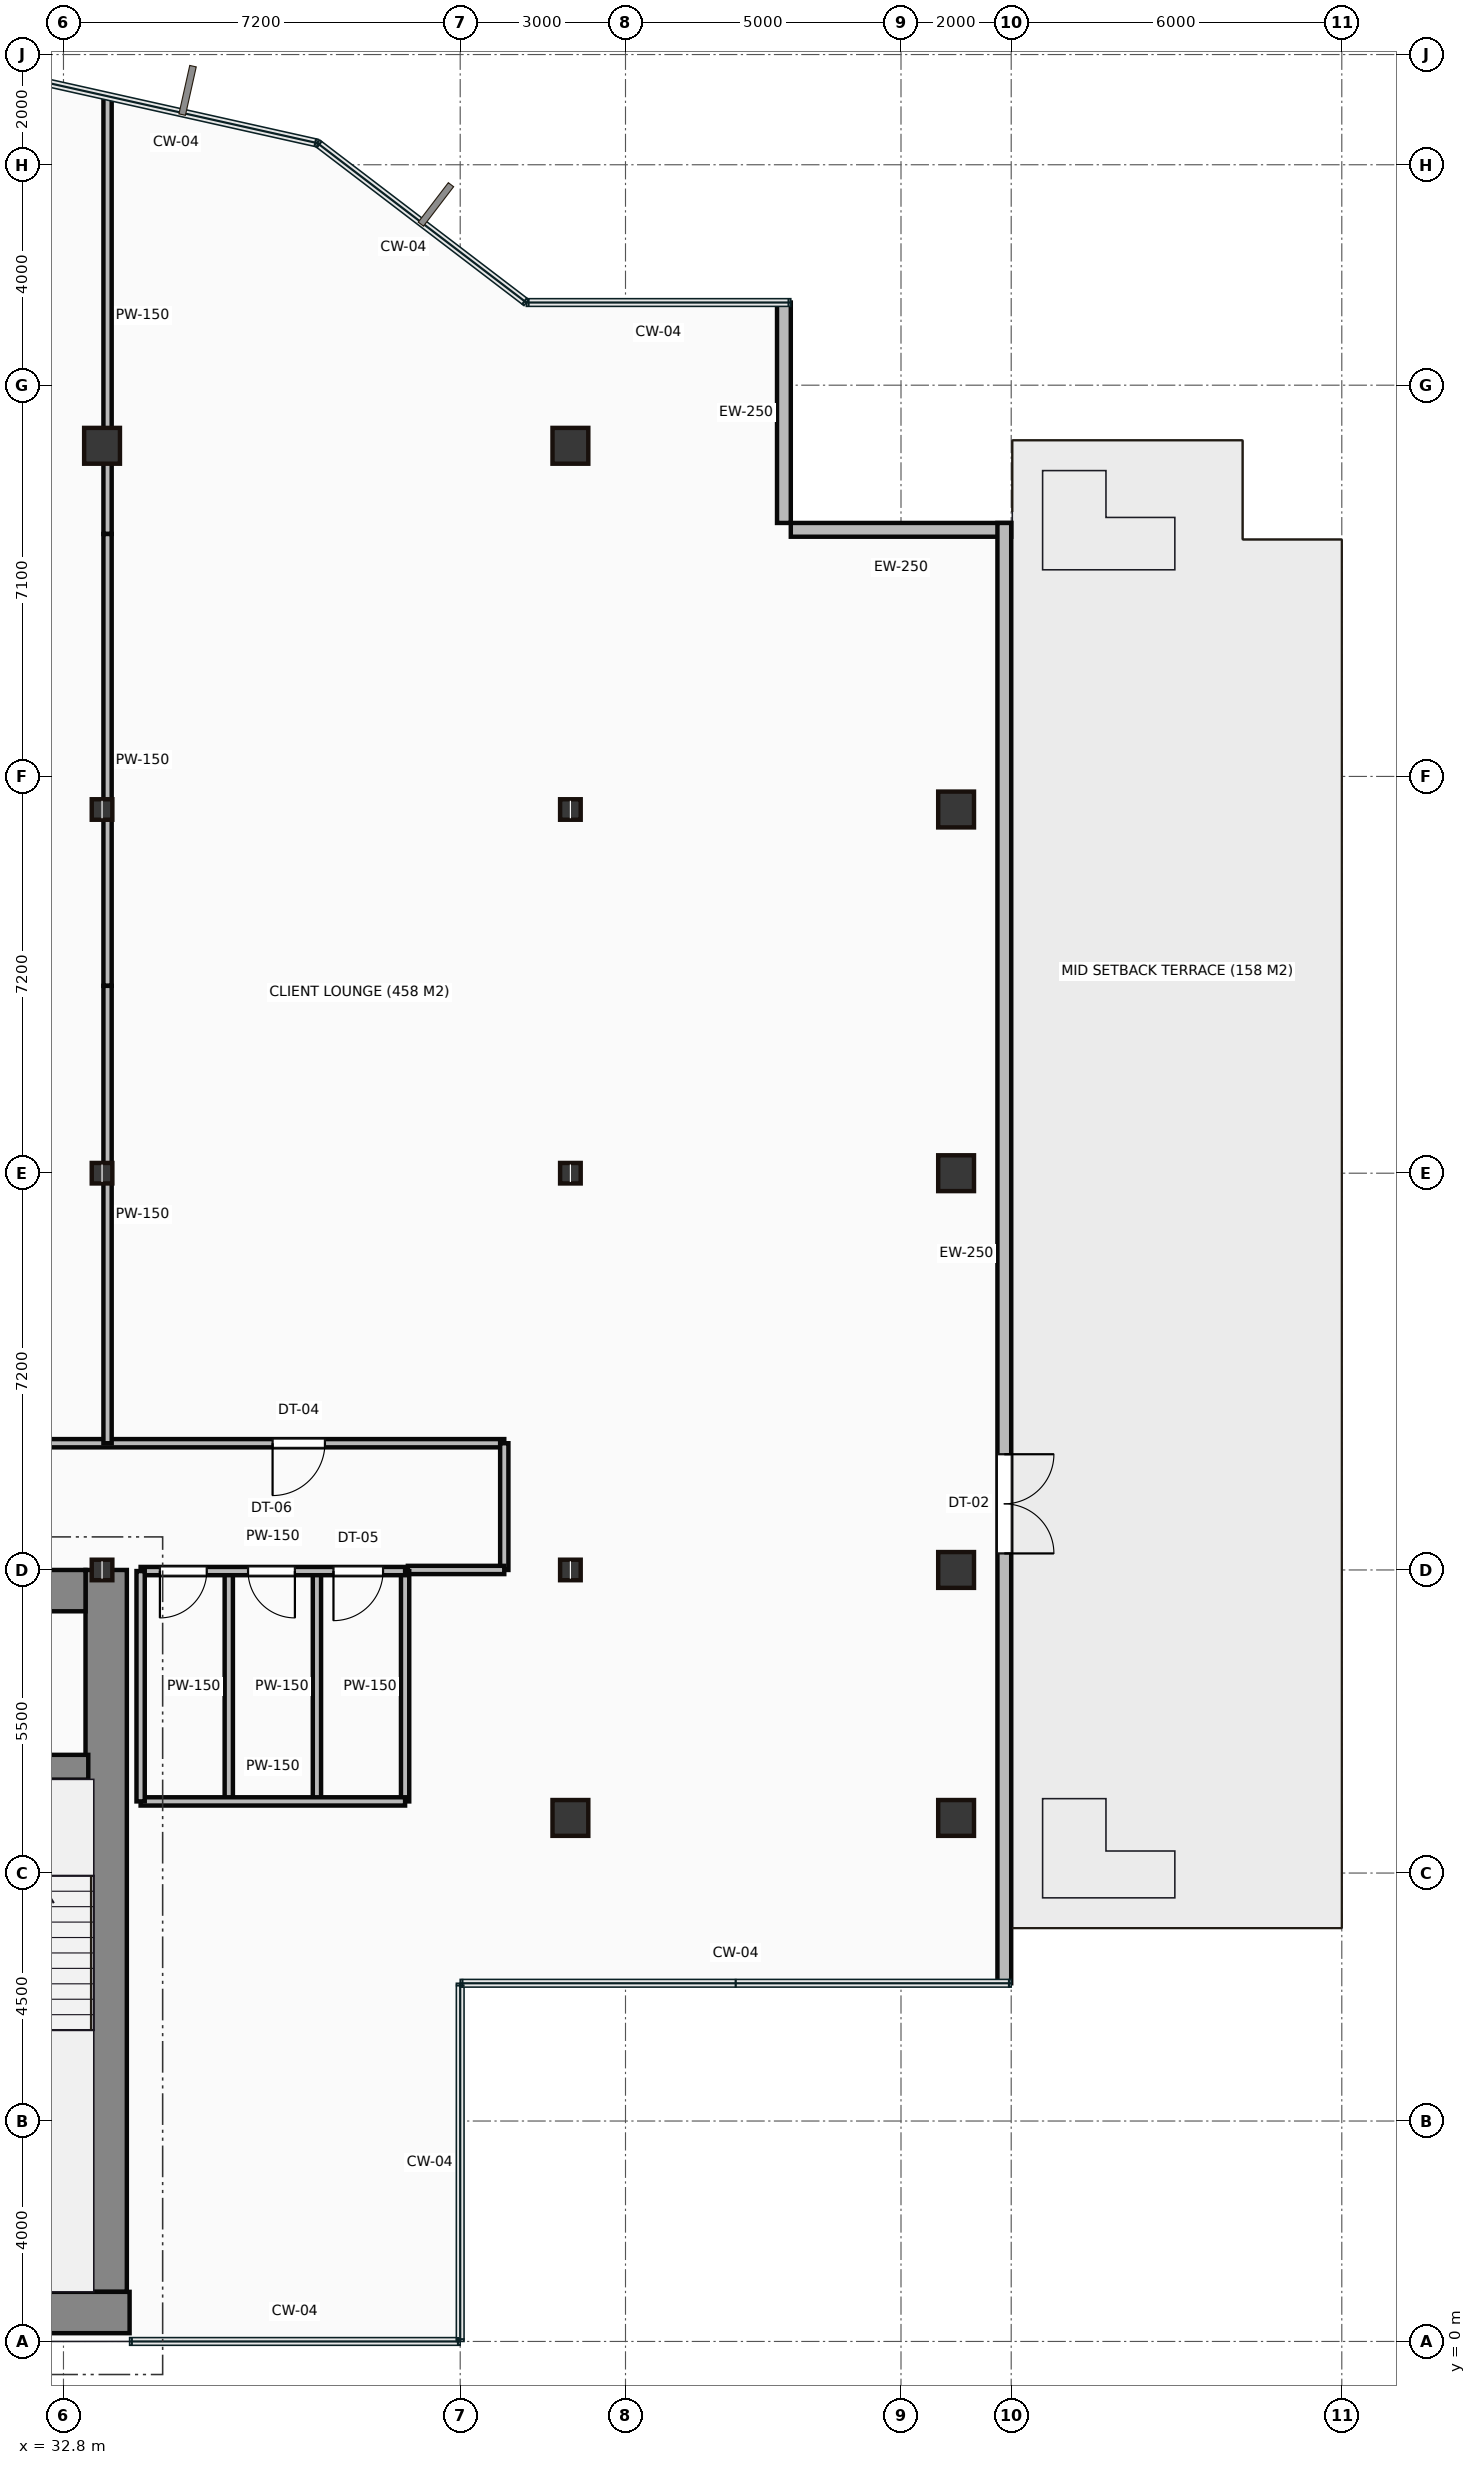
"""IFC4 building model, lengths in metres.
Left out: names, types, materials, properties, quantities, classifications, styles, units other than length and angle.
Written with IfcOpenShell. Run it as: python <this file> out.ifc"""

import sys

from ifc_helpers import new_model, si_unit, direction, frame, frame_2d, origin, origin_2d, place, context, subcontext, project, spatial, rectangle, hollow_rectangle, i_section, extrude, source, transform, mapped, element, fill, save


model = new_model("IFC4")
c1 = context("Model", 3, precision=1e-05, world=origin(), true_north=direction((0.0, 1.0)))
c2 = subcontext(c1, "Body", "Model", "MODEL_VIEW")
j1 = project(units=[si_unit("LENGTHUNIT", "METRE"), si_unit("PLANEANGLEUNIT", "RADIAN")], contexts=[c1])
p1 = place(None, origin())
s1 = spatial("IfcSite", under=j1, at=p1, CompositionType="ELEMENT")
p2 = place(p1, origin())
s2 = spatial("IfcBuilding", under=s1, at=p2, CompositionType="ELEMENT")
p3 = place(p2, frame((0.0, 0.0, 140.6)))
s3 = spatial("IfcBuildingStorey", under=s2, at=p3, CompositionType="ELEMENT", Elevation=140.6)
m1 = source(origin(), c2, "Body", "SweptSolid", [
    extrude(rectangle(XDim=29.5, YDim=0.75, at=frame_2d((14.75, 0.0))), origin(), (0.0, 0.0, 1.0), 3.65),
])
p4 = place(p3, frame((4.5, 0.525, 0.0), z_axis=(0.0, 0.0, 1.0), x_axis=(1.0, 0.0, 0.0)))
e1 = element("IfcWall", 1, at=p4, inside=s3, PredefinedType="SHEAR", context=c2, shape_type="MappedRepresentation", body=[
    mapped(m1, transform((0.0, 0.0, 0.0))),
])
m2 = source(origin(), c2, "Body", "SweptSolid", [
    extrude(rectangle(XDim=13.1, YDim=0.75, at=frame_2d((6.55, 0.0))), origin(), (0.0, 0.0, 1.0), 3.65),
])
p5 = place(p3, frame((33.575, 0.9, 0.0), z_axis=(0.0, 0.0, 1.0), x_axis=(0.0, 1.0, 0.0)))
e2 = element("IfcWall", 2, at=p5, inside=s3, PredefinedType="SHEAR", context=c2, shape_type="MappedRepresentation", body=[
    mapped(m2, transform((0.0, 0.0, 0.0))),
])
m3 = source(origin(), c2, "Body", "SweptSolid", [
    extrude(rectangle(XDim=12.6, YDim=0.75, at=frame_2d((6.3, 0.0))), origin(), (0.0, 0.0, 1.0), 3.65),
])
p6 = place(p3, frame((20.6, 13.625, 0.0), z_axis=(0.0, 0.0, 1.0), x_axis=(1.0, 0.0, 0.0)))
e3 = element("IfcWall", 3, at=p6, inside=s3, PredefinedType="SHEAR", context=c2, shape_type="MappedRepresentation", body=[
    mapped(m3, transform((0.0, 0.0, 0.0))),
])
p7 = place(p6, frame((9.25, 0.0, 0.0)))
e4 = element("IfcOpeningElement", 4, at=p7, cuts=e3, PredefinedType="OPENING", context=c2, shape_type="SweptSolid", body=[
    extrude(rectangle(XDim=1.1, YDim=2.15, at=frame_2d((0.55, 1.075))), frame((0.0, 0.385, 0.0), z_axis=(0.0, -1.0, 0.0), x_axis=(1.0, 0.0, 0.0)), (0.0, 0.0, 1.0), 0.77),
])
m4 = source(origin(), c2, "Body", "SweptSolid", [
    extrude(rectangle(XDim=3.39, YDim=0.45, at=frame_2d((1.695, 0.0))), origin(), (0.0, 0.0, 1.0), 3.65),
])
p8 = place(p3, frame((29.86, 10.42, 0.0), z_axis=(0.0, 0.0, 1.0), x_axis=(1.0, 0.0, 0.0)))
e5 = element("IfcWall", 5, at=p8, inside=s3, PredefinedType="SHEAR", context=c2, shape_type="MappedRepresentation", body=[
    mapped(m4, transform((0.0, 0.0, 0.0))),
])
p9 = place(p8, frame((1.1, 0.0, 0.0)))
e6 = element("IfcOpeningElement", 6, at=p9, cuts=e5, PredefinedType="OPENING", context=c2, shape_type="SweptSolid", body=[
    extrude(rectangle(XDim=1.1, YDim=2.15, at=frame_2d((0.55, 1.075))), frame((0.0, 0.235, 0.0), z_axis=(0.0, -1.0, 0.0), x_axis=(1.0, 0.0, 0.0)), (0.0, 0.0, 1.0), 0.47),
])
m5 = source(origin(), c2, "Body", "SweptSolid", [
    extrude(i_section(OverallWidth=0.374, OverallDepth=0.372, WebThickness=0.016, FlangeThickness=0.026, at=origin_2d()), origin(), (0.0, 0.0, 1.0), 3.65),
])
for number, where, z_axis, x_axis in (
    (7, (33.5, 14.0, 0.0), (0.0, 0.0, 1.0), (1.0, 0.0, 0.0)),
    (8, (33.5, 21.2, 0.0), (0.0, 0.0, 1.0), (1.0, 0.0, 0.0)),
    (9, (33.5, 27.8, 0.0), (0.0, 0.0, 1.0), (1.0, 0.0, 0.0)),
):
    element("IfcColumn", number, at=place(p3, frame(where, z_axis=z_axis, x_axis=x_axis)), inside=s3, PredefinedType="COLUMN", context=c2, shape_type="MappedRepresentation", body=[
        mapped(m5, transform((0.0, 0.0, 0.0))),
    ])
m6 = source(origin(), c2, "Body", "SweptSolid", [
    extrude(hollow_rectangle(XDim=0.65, YDim=0.65, WallThickness=0.032, at=origin_2d()), origin(), (0.0, 0.0, 1.0), 3.65),
])
for number, where, z_axis, x_axis in (
    (10, (33.5, 34.4, 0.0), (0.0, 0.0, 1.0), (1.0, 0.0, 0.0)),
    (11, (42.0, 9.5, 0.0), (0.0, 0.0, 1.0), (1.0, 0.0, 0.0)),
):
    element("IfcColumn", number, at=place(p3, frame(where, z_axis=z_axis, x_axis=x_axis)), inside=s3, PredefinedType="COLUMN", context=c2, shape_type="MappedRepresentation", body=[
        mapped(m6, transform((0.0, 0.0, 0.0))),
    ])
for number, where, z_axis, x_axis in (
    (12, (42.0, 14.0, 0.0), (0.0, 0.0, 1.0), (1.0, 0.0, 0.0)),
    (13, (42.0, 21.2, 0.0), (0.0, 0.0, 1.0), (1.0, 0.0, 0.0)),
    (14, (42.0, 27.8, 0.0), (0.0, 0.0, 1.0), (1.0, 0.0, 0.0)),
):
    element("IfcColumn", number, at=place(p3, frame(where, z_axis=z_axis, x_axis=x_axis)), inside=s3, PredefinedType="COLUMN", context=c2, shape_type="MappedRepresentation", body=[
        mapped(m5, transform((0.0, 0.0, 0.0))),
    ])
for number, where, z_axis, x_axis in (
    (15, (42.0, 34.4, 0.0), (0.0, 0.0, 1.0), (1.0, 0.0, 0.0)),
    (16, (49.0, 9.5, 0.0), (0.0, 0.0, 1.0), (1.0, 0.0, 0.0)),
    (17, (49.0, 14.0, 0.0), (0.0, 0.0, 1.0), (1.0, 0.0, 0.0)),
    (18, (49.0, 21.2, 0.0), (0.0, 0.0, 1.0), (1.0, 0.0, 0.0)),
    (19, (49.0, 27.8, 0.0), (0.0, 0.0, 1.0), (1.0, 0.0, 0.0)),
):
    element("IfcColumn", number, at=place(p3, frame(where, z_axis=z_axis, x_axis=x_axis)), inside=s3, PredefinedType="COLUMN", context=c2, shape_type="MappedRepresentation", body=[
        mapped(m6, transform((0.0, 0.0, 0.0))),
    ])
m7 = source(origin(), c2, "Body", "SweptSolid", [
    extrude(rectangle(XDim=26.5, YDim=0.25, at=frame_2d((13.25, 0.0))), origin(), (0.0, 0.0, 1.0), 3.4),
])
p10 = place(p3, frame((49.875, 6.5, 0.0), z_axis=(0.0, 0.0, 1.0), x_axis=(0.0, 1.0, 0.0)))
e20 = element("IfcWall", 20, at=p10, inside=s3, PredefinedType="STANDARD", context=c2, shape_type="MappedRepresentation", body=[
    mapped(m7, transform((0.0, 0.0, 0.0))),
])
p11 = place(p10, frame((7.8, 0.0, 0.0)))
e21 = element("IfcOpeningElement", 21, at=p11, cuts=e20, PredefinedType="OPENING", context=c2, shape_type="SweptSolid", body=[
    extrude(rectangle(XDim=1.8, YDim=2.2, at=frame_2d((0.9, 1.1))), frame((0.0, 0.135, 0.0), z_axis=(0.0, -1.0, 0.0), x_axis=(1.0, 0.0, 0.0)), (0.0, 0.0, 1.0), 0.27),
])
m8 = source(origin(), c2, "Body", "SweptSolid", [
    extrude(rectangle(XDim=4.0, YDim=0.25, at=frame_2d((2.0, 0.0))), origin(), (0.0, 0.0, 1.0), 3.4),
])
for number, where, z_axis, x_axis in (
    (22, (50.0, 32.875, 0.0), (0.0, 0.0, 1.0), (-1.0, 0.0, 0.0)),
    (23, (45.875, 33.0, 0.0), (0.0, 0.0, 1.0), (0.0, 1.0, 0.0)),
):
    element("IfcWall", number, at=place(p3, frame(where, z_axis=z_axis, x_axis=x_axis)), inside=s3, PredefinedType="STANDARD", context=c2, shape_type="MappedRepresentation", body=[
        mapped(m8, transform((0.0, 0.0, 0.0))),
    ])
m9 = source(origin(), c2, "Body", "SweptSolid", [
    extrude(rectangle(XDim=4.8, YDim=0.15, at=frame_2d((2.4, 0.0))), origin(), (0.0, 0.0, 1.0), 2.76),
])
p12 = place(p3, frame((34.2, 13.98, 0.0), z_axis=(0.0, 0.0, 1.0), x_axis=(1.0, 0.0, 0.0)))
e24 = element("IfcWall", 24, at=p12, inside=s3, PredefinedType="PARTITIONING", context=c2, shape_type="MappedRepresentation", body=[
    mapped(m9, transform((0.0, 0.0, 0.0))),
])
p13 = place(p12, frame((0.35, 0.0, 0.0)))
e25 = element("IfcOpeningElement", 25, at=p13, cuts=e24, PredefinedType="OPENING", context=c2, shape_type="SweptSolid", body=[
    extrude(rectangle(XDim=0.85, YDim=2.1, at=frame_2d((0.425, 1.05))), frame((0.0, 0.085, 0.0), z_axis=(0.0, -1.0, 0.0), x_axis=(1.0, 0.0, 0.0)), (0.0, 0.0, 1.0), 0.17),
])
p14 = place(p12, frame((1.95, 0.0, 0.0)))
e26 = element("IfcOpeningElement", 26, at=p14, cuts=e24, PredefinedType="OPENING", context=c2, shape_type="SweptSolid", body=[
    extrude(rectangle(XDim=0.85, YDim=2.1, at=frame_2d((0.425, 1.05))), frame((0.0, 0.085, 0.0), z_axis=(0.0, -1.0, 0.0), x_axis=(1.0, 0.0, 0.0)), (0.0, 0.0, 1.0), 0.17),
])
p15 = place(p12, frame((3.5, 0.0, 0.0)))
e27 = element("IfcOpeningElement", 27, at=p15, cuts=e24, PredefinedType="OPENING", context=c2, shape_type="SweptSolid", body=[
    extrude(rectangle(XDim=0.9, YDim=2.1, at=frame_2d((0.45, 1.05))), frame((0.0, 0.085, 0.0), z_axis=(0.0, -1.0, 0.0), x_axis=(1.0, 0.0, 0.0)), (0.0, 0.0, 1.0), 0.17),
])
m10 = source(origin(), c2, "Body", "SweptSolid", [
    extrude(rectangle(XDim=4.8, YDim=0.15, at=frame_2d((2.4, 0.0))), origin(), (0.0, 0.0, 1.0), 3.4),
])
p16 = place(p3, frame((34.2, 9.8, 0.0), z_axis=(0.0, 0.0, 1.0), x_axis=(1.0, 0.0, 0.0)))
e28 = element("IfcWall", 28, at=p16, inside=s3, PredefinedType="PARTITIONING", context=c2, shape_type="MappedRepresentation", body=[
    mapped(m10, transform((0.0, 0.0, 0.0))),
])
m11 = source(origin(), c2, "Body", "SweptSolid", [
    extrude(rectangle(XDim=4.18, YDim=0.15, at=frame_2d((2.09, 0.0))), origin(), (0.0, 0.0, 1.0), 3.4),
])
for number, where, z_axis, x_axis in (
    (29, (39.0, 9.8, 0.0), (0.0, 0.0, 1.0), (0.0, 1.0, 0.0)),
    (30, (34.2, 9.8, 0.0), (0.0, 0.0, 1.0), (0.0, 1.0, 0.0)),
    (31, (35.8, 9.8, 0.0), (0.0, 0.0, 1.0), (0.0, 1.0, 0.0)),
    (32, (37.4, 9.8, 0.0), (0.0, 0.0, 1.0), (0.0, 1.0, 0.0)),
):
    element("IfcWall", number, at=place(p3, frame(where, z_axis=z_axis, x_axis=x_axis)), inside=s3, PredefinedType="PARTITIONING", context=c2, shape_type="MappedRepresentation", body=[
        mapped(m11, transform((0.0, 0.0, 0.0))),
    ])
m12 = source(origin(), c2, "Body", "SweptSolid", [
    extrude(rectangle(XDim=28.75, YDim=0.15, at=frame_2d((14.375, 0.0))), origin(), (0.0, 0.0, 1.0), 3.4),
])
p17 = place(p3, frame((12.05, 16.3, 0.0), z_axis=(0.0, 0.0, 1.0), x_axis=(1.0, 0.0, 0.0)))
e33 = element("IfcWall", 33, at=p17, inside=s3, PredefinedType="PARTITIONING", context=c2, shape_type="MappedRepresentation", body=[
    mapped(m12, transform((0.0, 0.0, 0.0))),
])
p18 = place(p17, frame((4.83, 0.0, 0.0)))
e34 = element("IfcOpeningElement", 34, at=p18, cuts=e33, PredefinedType="OPENING", context=c2, shape_type="SweptSolid", body=[
    extrude(rectangle(XDim=0.95, YDim=2.15, at=frame_2d((0.475, 1.075))), frame((0.0, 0.085, 0.0), z_axis=(0.0, -1.0, 0.0), x_axis=(1.0, 0.0, 0.0)), (0.0, 0.0, 1.0), 0.17),
])
p19 = place(p17, frame((15.475, 0.0, 0.0)))
e35 = element("IfcOpeningElement", 35, at=p19, cuts=e33, PredefinedType="OPENING", context=c2, shape_type="SweptSolid", body=[
    extrude(rectangle(XDim=0.95, YDim=2.15, at=frame_2d((0.475, 1.075))), frame((0.0, 0.085, 0.0), z_axis=(0.0, -1.0, 0.0), x_axis=(1.0, 0.0, 0.0)), (0.0, 0.0, 1.0), 0.17),
])
p20 = place(p17, frame((24.545, 0.0, 0.0)))
e36 = element("IfcOpeningElement", 36, at=p20, cuts=e33, PredefinedType="OPENING", context=c2, shape_type="SweptSolid", body=[
    extrude(rectangle(XDim=0.95, YDim=2.15, at=frame_2d((0.475, 1.075))), frame((0.0, 0.085, 0.0), z_axis=(0.0, -1.0, 0.0), x_axis=(1.0, 0.0, 0.0)), (0.0, 0.0, 1.0), 0.17),
])
m13 = source(origin(), c2, "Body", "SweptSolid", [
    extrude(rectangle(XDim=2.3, YDim=0.15, at=frame_2d((1.15, 0.0))), origin(), (0.0, 0.0, 1.0), 3.4),
])
p21 = place(p3, frame((40.8, 16.3, 0.0), z_axis=(0.0, 0.0, 1.0), x_axis=(0.0, -1.0, 0.0)))
e37 = element("IfcWall", 37, at=p21, inside=s3, PredefinedType="PARTITIONING", context=c2, shape_type="MappedRepresentation", body=[
    mapped(m13, transform((0.0, 0.0, 0.0))),
])
m14 = source(origin(), c2, "Body", "SweptSolid", [
    extrude(rectangle(XDim=1.75, YDim=0.15, at=frame_2d((0.875, 0.0))), origin(), (0.0, 0.0, 1.0), 2.76),
])
p22 = place(p3, frame((40.8, 14.0, 0.0), z_axis=(0.0, 0.0, 1.0), x_axis=(-1.0, 0.0, 0.0)))
e38 = element("IfcWall", 38, at=p22, inside=s3, PredefinedType="PARTITIONING", context=c2, shape_type="MappedRepresentation", body=[
    mapped(m14, transform((0.0, 0.0, 0.0))),
])
m15 = source(origin(), c2, "Body", "SweptSolid", [
    extrude(rectangle(XDim=7.923, YDim=0.15, at=frame_2d((3.962, 0.0))), origin(), (0.0, 0.0, 1.0), 2.76),
])
p23 = place(p3, frame((33.6, 40.723, 0.0), z_axis=(0.0, 0.0, 1.0), x_axis=(0.0, -1.0, 0.0)))
e39 = element("IfcWall", 39, at=p23, inside=s3, PredefinedType="PARTITIONING", context=c2, shape_type="MappedRepresentation", body=[
    mapped(m15, transform((0.0, 0.0, 0.0))),
])
m16 = source(origin(), c2, "Body", "SweptSolid", [
    extrude(rectangle(XDim=8.2, YDim=0.15, at=frame_2d((4.1, 0.0))), origin(), (0.0, 0.0, 1.0), 2.76),
])
p24 = place(p3, frame((33.6, 32.8, 0.0), z_axis=(0.0, 0.0, 1.0), x_axis=(0.0, -1.0, 0.0)))
e40 = element("IfcWall", 40, at=p24, inside=s3, PredefinedType="PARTITIONING", context=c2, shape_type="MappedRepresentation", body=[
    mapped(m16, transform((0.0, 0.0, 0.0))),
])
m17 = source(origin(), c2, "Body", "SweptSolid", [
    extrude(rectangle(XDim=8.3, YDim=0.15, at=frame_2d((4.15, 0.0))), origin(), (0.0, 0.0, 1.0), 2.76),
])
p25 = place(p3, frame((33.6, 24.6, 0.0), z_axis=(0.0, 0.0, 1.0), x_axis=(0.0, -1.0, 0.0)))
e41 = element("IfcWall", 41, at=p25, inside=s3, PredefinedType="PARTITIONING", context=c2, shape_type="MappedRepresentation", body=[
    mapped(m17, transform((0.0, 0.0, 0.0))),
])
m18 = source(origin(), c2, "Body", "SweptSolid", [
    extrude(rectangle(XDim=1.8, YDim=2.2, at=frame_2d((0.9, 1.1))), frame((0.0, 0.025, 0.0), z_axis=(0.0, -1.0, 0.0), x_axis=(1.0, 0.0, 0.0)), (0.0, 0.0, 1.0), 0.05),
])
p26 = place(p11, frame((1.8, 0.0, 0.0), z_axis=(0.0, 0.0, 1.0), x_axis=(-1.0, 0.0, 0.0)))
e42 = element("IfcDoor", 42, at=p26, inside=s3, OperationType="DOUBLE_DOOR_SINGLE_SWING", PredefinedType="DOOR", context=c2, shape_type="MappedRepresentation", body=[
    mapped(m18, transform((0.0, 0.0, 0.0))),
])
fill(e21, e42)
m19 = source(origin(), c2, "Body", "SweptSolid", [
    extrude(rectangle(XDim=0.85, YDim=2.1, at=frame_2d((0.425, 1.05))), frame((0.0, 0.025, 0.0), z_axis=(0.0, -1.0, 0.0), x_axis=(1.0, 0.0, 0.0)), (0.0, 0.0, 1.0), 0.05),
])
p27 = place(p13, frame((0.85, 0.0, 0.0), z_axis=(0.0, 0.0, 1.0), x_axis=(-1.0, 0.0, 0.0)))
e43 = element("IfcDoor", 43, at=p27, inside=s3, OperationType="SINGLE_SWING_LEFT", PredefinedType="DOOR", context=c2, shape_type="MappedRepresentation", body=[
    mapped(m19, transform((0.0, 0.0, 0.0))),
])
fill(e25, e43)
p28 = place(p14, frame((0.85, 0.0, 0.0), z_axis=(0.0, 0.0, 1.0), x_axis=(-1.0, 0.0, 0.0)))
e44 = element("IfcDoor", 44, at=p28, inside=s3, OperationType="SINGLE_SWING_RIGHT", PredefinedType="DOOR", context=c2, shape_type="MappedRepresentation", body=[
    mapped(m19, transform((0.0, 0.0, 0.0))),
])
fill(e26, e44)
m20 = source(origin(), c2, "Body", "SweptSolid", [
    extrude(rectangle(XDim=0.9, YDim=2.1, at=frame_2d((0.45, 1.05))), frame((0.0, 0.025, 0.0), z_axis=(0.0, -1.0, 0.0), x_axis=(1.0, 0.0, 0.0)), (0.0, 0.0, 1.0), 0.05),
])
p29 = place(p15, frame((0.9, 0.0, 0.0), z_axis=(0.0, 0.0, 1.0), x_axis=(-1.0, 0.0, 0.0)))
e45 = element("IfcDoor", 45, at=p29, inside=s3, OperationType="SINGLE_SWING_LEFT", PredefinedType="DOOR", context=c2, shape_type="MappedRepresentation", body=[
    mapped(m20, transform((0.0, 0.0, 0.0))),
])
fill(e27, e45)
m21 = source(origin(), c2, "Body", "SweptSolid", [
    extrude(rectangle(XDim=0.95, YDim=2.15, at=frame_2d((0.475, 1.075))), frame((0.0, 0.025, 0.0), z_axis=(0.0, -1.0, 0.0), x_axis=(1.0, 0.0, 0.0)), (0.0, 0.0, 1.0), 0.05),
])
p30 = place(p20, origin())
e46 = element("IfcDoor", 46, at=p30, inside=s3, OperationType="SINGLE_SWING_LEFT", PredefinedType="DOOR", context=c2, shape_type="MappedRepresentation", body=[
    mapped(m21, transform((0.0, 0.0, 0.0))),
])
fill(e36, e46)
save(model, sys.argv[1])
